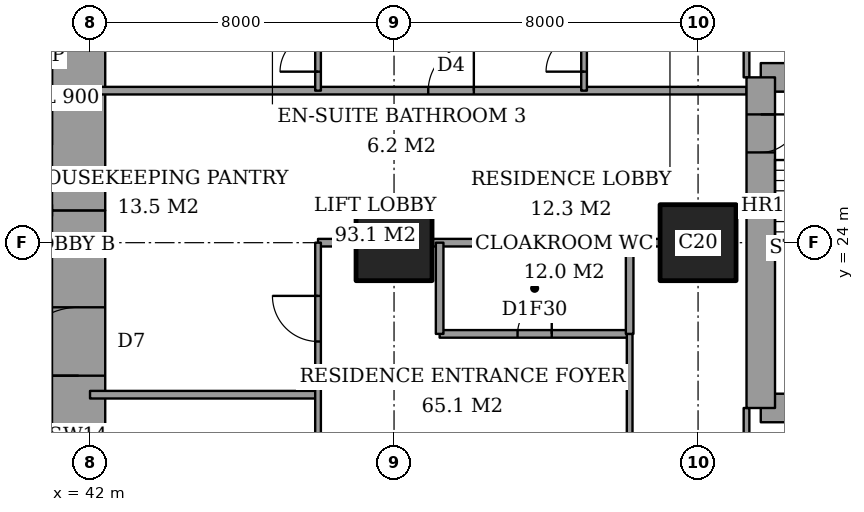
"""IFC4 building model, lengths in metres.
Left out: names, types, materials, properties, quantities, classifications, styles, units other than length and angle.
Written with IfcOpenShell. Run it as: python <this file> out.ifc"""

import sys

from ifc_helpers import new_model, si_unit, direction, frame, frame_2d, origin, origin_2d, place, context, subcontext, project, spatial, rectangle, extrude, element, fill, save


model = new_model("IFC4")
c1 = context("Model", 3, precision=1e-05, world=origin(), true_north=direction((0.0, 1.0)))
c2 = subcontext(c1, "Body", "Model", "MODEL_VIEW")
j1 = project(units=[si_unit("LENGTHUNIT", "METRE"), si_unit("PLANEANGLEUNIT", "RADIAN")], contexts=[c1])
p1 = place(None, origin())
s1 = spatial("IfcSite", under=j1, at=p1, CompositionType="ELEMENT")
p2 = place(p1, origin())
s2 = spatial("IfcBuilding", under=s1, at=p2, CompositionType="ELEMENT")
p3 = place(p2, frame((0.0, 0.0, 99.8)))
s3 = spatial("IfcBuildingStorey", under=s2, at=p3, CompositionType="ELEMENT", Elevation=99.8)
for number, where, z_axis, x_axis in (
    (1, (50.0, 24.0, 0.0), (0.0, 0.0, 1.0), (1.0, 0.0, 0.0)),
    (2, (58.0, 24.0, 0.0), (0.0, 0.0, 1.0), (1.0, 0.0, 0.0)),
):
    element("IfcColumn", number, at=place(p3, frame(where, z_axis=z_axis, x_axis=x_axis)), inside=s3, PredefinedType="COLUMN", context=c2, shape_type="SweptSolid", body=[
        extrude(rectangle(XDim=2.0, YDim=2.0, at=origin_2d()), origin(), (0.0, 0.0, 1.0), 3.6),
    ])
p4 = place(p3, frame((41.7, 13.0, 0.0), z_axis=(0.0, 0.0, 1.0), x_axis=(0.0, 1.0, 0.0)))
e3 = element("IfcWall", 3, at=p4, inside=s3, PredefinedType="SHEAR", context=c2, shape_type="SweptSolid", body=[
    extrude(rectangle(XDim=11.85, YDim=1.4, at=frame_2d((5.925, 0.0))), origin(), (0.0, 0.0, 1.0), 3.6),
])
p5 = place(p4, frame((7.5, 0.0, 0.0)))
e4 = element("IfcOpeningElement", 4, at=p5, cuts=e3, PredefinedType="OPENING", context=c2, shape_type="SweptSolid", body=[
    extrude(rectangle(XDim=1.8, YDim=2.4, at=frame_2d((0.9, 1.2))), frame((0.0, 0.71, 0.0), z_axis=(0.0, -1.0, 0.0), x_axis=(1.0, 0.0, 0.0)), (0.0, 0.0, 1.0), 1.42),
])
p6 = place(p3, frame((41.7, 24.85, 0.0), z_axis=(0.0, 0.0, 1.0), x_axis=(0.0, 1.0, 0.0)))
e5 = element("IfcWall", 5, at=p6, inside=s3, PredefinedType="SHEAR", context=c2, shape_type="SweptSolid", body=[
    extrude(rectangle(XDim=10.15, YDim=1.4, at=frame_2d((5.075, 0.0))), origin(), (0.0, 0.0, 1.0), 3.6),
])
for number, where, z_axis, x_axis in (
    (6, (59.65, 19.65, 0.0), (0.0, 0.0, 1.0), (1.0, 0.0, 0.0)),
    (7, (64.1, 28.35, 0.0), (0.0, 0.0, 1.0), (-1.0, 0.0, 0.0)),
):
    element("IfcWall", number, at=place(p3, frame(where, z_axis=z_axis, x_axis=x_axis)), inside=s3, PredefinedType="SHEAR", context=c2, shape_type="SweptSolid", body=[
        extrude(rectangle(XDim=4.45, YDim=0.75, at=frame_2d((2.225, 0.0))), origin(), (0.0, 0.0, 1.0), 3.6),
    ])
p7 = place(p3, frame((59.65, 28.35, 0.0), z_axis=(0.0, 0.0, 1.0), x_axis=(0.0, -1.0, 0.0)))
e8 = element("IfcWall", 8, at=p7, inside=s3, PredefinedType="SHEAR", context=c2, shape_type="SweptSolid", body=[
    extrude(rectangle(XDim=8.7, YDim=0.75, at=frame_2d((4.35, 0.0))), origin(), (0.0, 0.0, 1.0), 3.6),
])
p8 = place(p7, frame((0.975, 0.0, 0.0)))
e9 = element("IfcOpeningElement", 9, at=p8, cuts=e8, PredefinedType="OPENING", context=c2, shape_type="SweptSolid", body=[
    extrude(rectangle(XDim=1.0, YDim=2.1, at=frame_2d((0.5, 1.05))), frame((0.0, 0.385, 0.0), z_axis=(0.0, -1.0, 0.0), x_axis=(1.0, 0.0, 0.0)), (0.0, 0.0, 1.0), 0.77),
])
p9 = place(p3, frame((42.0, 20.0, 0.0), z_axis=(0.0, 0.0, 1.0), x_axis=(1.0, 0.0, 0.0)))
e10 = element("IfcWall", 10, at=p9, inside=s3, PredefinedType="PARTITIONING", context=c2, shape_type="SweptSolid", body=[
    extrude(rectangle(XDim=6.0, YDim=0.2, at=frame_2d((3.0, 0.0))), origin(), (0.0, 0.0, 1.0), 3.35),
])
p10 = place(p3, frame((51.2, 21.6, 0.0), z_axis=(0.0, 0.0, 1.0), x_axis=(1.0, 0.0, 0.0)))
e11 = element("IfcWall", 11, at=p10, inside=s3, PredefinedType="PARTITIONING", context=c2, shape_type="SweptSolid", body=[
    extrude(rectangle(XDim=5.0, YDim=0.2, at=frame_2d((2.5, 0.0))), origin(), (0.0, 0.0, 1.0), 3.35),
])
p11 = place(p10, frame((2.05, 0.0, 0.0)))
e12 = element("IfcOpeningElement", 12, at=p11, cuts=e11, PredefinedType="OPENING", context=c2, shape_type="SweptSolid", body=[
    extrude(rectangle(XDim=0.9, YDim=2.1, at=frame_2d((0.45, 1.05))), frame((0.0, 0.11, 0.0), z_axis=(0.0, -1.0, 0.0), x_axis=(1.0, 0.0, 0.0)), (0.0, 0.0, 1.0), 0.22),
])
p12 = place(p3, frame((48.0, 24.0, 0.0), z_axis=(0.0, 0.0, 1.0), x_axis=(1.0, 0.0, 0.0)))
e13 = element("IfcWall", 13, at=p12, inside=s3, PredefinedType="PARTITIONING", context=c2, shape_type="SweptSolid", body=[
    extrude(rectangle(XDim=1.0, YDim=0.2, at=frame_2d((0.5, 0.0))), origin(), (0.0, 0.0, 1.0), 3.35),
])
p13 = place(p3, frame((51.0, 24.0, 0.0), z_axis=(0.0, 0.0, 1.0), x_axis=(1.0, 0.0, 0.0)))
e14 = element("IfcWall", 14, at=p13, inside=s3, PredefinedType="PARTITIONING", context=c2, shape_type="SweptSolid", body=[
    extrude(rectangle(XDim=6.0, YDim=0.2, at=frame_2d((3.0, 0.0))), origin(), (0.0, 0.0, 1.0), 3.35),
])
p14 = place(p3, frame((42.0, 28.0, 0.0), z_axis=(0.0, 0.0, 1.0), x_axis=(1.0, 0.0, 0.0)))
e15 = element("IfcWall", 15, at=p14, inside=s3, PredefinedType="PARTITIONING", context=c2, shape_type="SweptSolid", body=[
    extrude(rectangle(XDim=17.275, YDim=0.2, at=frame_2d((8.637, 0.0))), origin(), (0.0, 0.0, 1.0), 3.35),
])
p15 = place(p14, frame((8.9, 0.0, 0.0)))
e16 = element("IfcOpeningElement", 16, at=p15, cuts=e15, PredefinedType="OPENING", context=c2, shape_type="SweptSolid", body=[
    extrude(rectangle(XDim=1.2, YDim=2.4, at=frame_2d((0.6, 1.2))), frame((0.0, 0.11, 0.0), z_axis=(0.0, -1.0, 0.0), x_axis=(1.0, 0.0, 0.0)), (0.0, 0.0, 1.0), 0.22),
])
p16 = place(p3, frame((48.0, 10.6, 0.0), z_axis=(0.0, 0.0, 1.0), x_axis=(0.0, 1.0, 0.0)))
e17 = element("IfcWall", 17, at=p16, inside=s3, PredefinedType="PARTITIONING", context=c2, shape_type="SweptSolid", body=[
    extrude(rectangle(XDim=13.4, YDim=0.15, at=frame_2d((6.7, 0.0))), origin(), (0.0, 0.0, 1.0), 3.35),
])
p17 = place(p16, frame((10.8, 0.0, 0.0)))
e18 = element("IfcOpeningElement", 18, at=p17, cuts=e17, PredefinedType="OPENING", context=c2, shape_type="SweptSolid", body=[
    extrude(rectangle(XDim=1.2, YDim=2.4, at=frame_2d((0.6, 1.2))), frame((0.0, 0.085, 0.0), z_axis=(0.0, -1.0, 0.0), x_axis=(1.0, 0.0, 0.0)), (0.0, 0.0, 1.0), 0.17),
])
p18 = place(p16, frame((6.7, 0.0, 0.0)))
e19 = element("IfcOpeningElement", 19, at=p18, cuts=e17, PredefinedType="OPENING", context=c2, shape_type="SweptSolid", body=[
    extrude(rectangle(XDim=0.9, YDim=2.1, at=frame_2d((0.45, 1.05))), frame((0.0, 0.085, 0.0), z_axis=(0.0, -1.0, 0.0), x_axis=(1.0, 0.0, 0.0)), (0.0, 0.0, 1.0), 0.17),
])
p19 = place(p3, frame((48.0, 28.0, 0.0), z_axis=(0.0, 0.0, 1.0), x_axis=(0.0, 1.0, 0.0)))
e20 = element("IfcWall", 20, at=p19, inside=s3, PredefinedType="PARTITIONING", context=c2, shape_type="SweptSolid", body=[
    extrude(rectangle(XDim=9.4, YDim=0.15, at=frame_2d((4.7, 0.0))), origin(), (0.0, 0.0, 1.0), 3.35),
])
p20 = place(p19, frame((0.5, 0.0, 0.0)))
e21 = element("IfcOpeningElement", 21, at=p20, cuts=e20, PredefinedType="OPENING", context=c2, shape_type="SweptSolid", body=[
    extrude(rectangle(XDim=1.0, YDim=2.1, at=frame_2d((0.5, 1.05))), frame((0.0, 0.085, 0.0), z_axis=(0.0, -1.0, 0.0), x_axis=(1.0, 0.0, 0.0)), (0.0, 0.0, 1.0), 0.17),
])
p21 = place(p3, frame((51.2, 21.6, 0.0), z_axis=(0.0, 0.0, 1.0), x_axis=(0.0, 1.0, 0.0)))
e22 = element("IfcWall", 22, at=p21, inside=s3, PredefinedType="PARTITIONING", context=c2, shape_type="SweptSolid", body=[
    extrude(rectangle(XDim=2.4, YDim=0.2, at=frame_2d((1.2, 0.0))), origin(), (0.0, 0.0, 1.0), 3.35),
])
p22 = place(p3, frame((55.0, 28.0, 0.0), z_axis=(0.0, 0.0, 1.0), x_axis=(0.0, 1.0, 0.0)))
e23 = element("IfcWall", 23, at=p22, inside=s3, PredefinedType="PARTITIONING", context=c2, shape_type="SweptSolid", body=[
    extrude(rectangle(XDim=9.4, YDim=0.15, at=frame_2d((4.7, 0.0))), origin(), (0.0, 0.0, 1.0), 3.35),
])
p23 = place(p22, frame((0.5, 0.0, 0.0)))
e24 = element("IfcOpeningElement", 24, at=p23, cuts=e23, PredefinedType="OPENING", context=c2, shape_type="SweptSolid", body=[
    extrude(rectangle(XDim=1.0, YDim=2.1, at=frame_2d((0.5, 1.05))), frame((0.0, 0.085, 0.0), z_axis=(0.0, -1.0, 0.0), x_axis=(1.0, 0.0, 0.0)), (0.0, 0.0, 1.0), 0.17),
])
p24 = place(p3, frame((56.2, 21.6, 0.0), z_axis=(0.0, 0.0, 1.0), x_axis=(0.0, 1.0, 0.0)))
e25 = element("IfcWall", 25, at=p24, inside=s3, PredefinedType="PARTITIONING", context=c2, shape_type="SweptSolid", body=[
    extrude(rectangle(XDim=2.4, YDim=0.2, at=frame_2d((1.2, 0.0))), origin(), (0.0, 0.0, 1.0), 3.35),
])
p25 = place(p3, frame((56.2, 10.6, 0.0), z_axis=(0.0, 0.0, 1.0), x_axis=(0.0, 1.0, 0.0)))
e26 = element("IfcWall", 26, at=p25, inside=s3, PredefinedType="PARTITIONING", context=c2, shape_type="SweptSolid", body=[
    extrude(rectangle(XDim=11.0, YDim=0.15, at=frame_2d((5.5, 0.0))), origin(), (0.0, 0.0, 1.0), 3.35),
])
p26 = place(p25, frame((7.0, 0.0, 0.0)))
e27 = element("IfcOpeningElement", 27, at=p26, cuts=e26, PredefinedType="OPENING", context=c2, shape_type="SweptSolid", body=[
    extrude(rectangle(XDim=1.0, YDim=2.1, at=frame_2d((0.5, 1.05))), frame((0.0, 0.085, 0.0), z_axis=(0.0, -1.0, 0.0), x_axis=(1.0, 0.0, 0.0)), (0.0, 0.0, 1.0), 0.17),
])
p27 = place(p3, frame((59.275, 17.2, 0.0), z_axis=(0.0, 0.0, 1.0), x_axis=(0.0, 1.0, 0.0)))
e28 = element("IfcWall", 28, at=p27, inside=s3, PredefinedType="PARTITIONING", context=c2, shape_type="SweptSolid", body=[
    extrude(rectangle(XDim=2.45, YDim=0.15, at=frame_2d((1.225, 0.0))), origin(), (0.0, 0.0, 1.0), 3.35),
])
p28 = place(p27, frame((0.538, 0.0, 0.0)))
e29 = element("IfcOpeningElement", 29, at=p28, cuts=e28, PredefinedType="OPENING", context=c2, shape_type="SweptSolid", body=[
    extrude(rectangle(XDim=1.0, YDim=2.1, at=frame_2d((0.5, 1.05))), frame((0.0, 0.085, 0.0), z_axis=(0.0, -1.0, 0.0), x_axis=(1.0, 0.0, 0.0)), (0.0, 0.0, 1.0), 0.17),
])
p29 = place(p3, frame((59.275, 28.35, 0.0), z_axis=(0.0, 0.0, 1.0), x_axis=(0.0, 1.0, 0.0)))
e30 = element("IfcWall", 30, at=p29, inside=s3, PredefinedType="PARTITIONING", context=c2, shape_type="SweptSolid", body=[
    extrude(rectangle(XDim=2.45, YDim=0.15, at=frame_2d((1.225, 0.0))), origin(), (0.0, 0.0, 1.0), 3.35),
])
p30 = place(p29, frame((0.913, 0.0, 0.0)))
e31 = element("IfcOpeningElement", 31, at=p30, cuts=e30, PredefinedType="OPENING", context=c2, shape_type="SweptSolid", body=[
    extrude(rectangle(XDim=1.0, YDim=2.1, at=frame_2d((0.5, 1.05))), frame((0.0, 0.085, 0.0), z_axis=(0.0, -1.0, 0.0), x_axis=(1.0, 0.0, 0.0)), (0.0, 0.0, 1.0), 0.17),
])
p31 = place(p11, origin())
e32 = element("IfcDoor", 32, at=p31, inside=s3, OperationType="SINGLE_SWING_LEFT", PredefinedType="DOOR", context=c2, shape_type="SweptSolid", body=[
    extrude(rectangle(XDim=0.9, YDim=2.1, at=frame_2d((0.45, 1.05))), frame((0.0, 0.025, 0.0), z_axis=(0.0, -1.0, 0.0), x_axis=(1.0, 0.0, 0.0)), (0.0, 0.0, 1.0), 0.05),
])
fill(e12, e32)
p32 = place(p17, origin())
e33 = element("IfcDoor", 33, at=p32, inside=s3, OperationType="SINGLE_SWING_LEFT", PredefinedType="DOOR", context=c2, shape_type="SweptSolid", body=[
    extrude(rectangle(XDim=1.2, YDim=2.4, at=frame_2d((0.6, 1.2))), frame((0.0, 0.025, 0.0), z_axis=(0.0, -1.0, 0.0), x_axis=(1.0, 0.0, 0.0)), (0.0, 0.0, 1.0), 0.05),
])
fill(e18, e33)
p33 = place(p23, origin())
e34 = element("IfcDoor", 34, at=p33, inside=s3, OperationType="SINGLE_SWING_RIGHT", PredefinedType="DOOR", context=c2, shape_type="SweptSolid", body=[
    extrude(rectangle(XDim=1.0, YDim=2.1, at=frame_2d((0.5, 1.05))), frame((0.0, 0.025, 0.0), z_axis=(0.0, -1.0, 0.0), x_axis=(1.0, 0.0, 0.0)), (0.0, 0.0, 1.0), 0.05),
])
fill(e24, e34)
p34 = place(p15, origin())
e35 = element("IfcDoor", 35, at=p34, inside=s3, OperationType="SINGLE_SWING_LEFT", PredefinedType="DOOR", context=c2, shape_type="SweptSolid", body=[
    extrude(rectangle(XDim=1.2, YDim=2.4, at=frame_2d((0.6, 1.2))), frame((0.0, 0.025, 0.0), z_axis=(0.0, -1.0, 0.0), x_axis=(1.0, 0.0, 0.0)), (0.0, 0.0, 1.0), 0.05),
])
fill(e16, e35)
p35 = place(p20, origin())
e36 = element("IfcDoor", 36, at=p35, inside=s3, OperationType="SINGLE_SWING_RIGHT", PredefinedType="DOOR", context=c2, shape_type="SweptSolid", body=[
    extrude(rectangle(XDim=1.0, YDim=2.1, at=frame_2d((0.5, 1.05))), frame((0.0, 0.025, 0.0), z_axis=(0.0, -1.0, 0.0), x_axis=(1.0, 0.0, 0.0)), (0.0, 0.0, 1.0), 0.05),
])
fill(e21, e36)
p36 = place(p5, origin())
e37 = element("IfcDoor", 37, at=p36, inside=s3, OperationType="DOUBLE_DOOR_DOUBLE_SWING", PredefinedType="DOOR", context=c2, shape_type="SweptSolid", body=[
    extrude(rectangle(XDim=1.8, YDim=2.4, at=frame_2d((0.9, 1.2))), frame((0.0, 0.025, 0.0), z_axis=(0.0, -1.0, 0.0), x_axis=(1.0, 0.0, 0.0)), (0.0, 0.0, 1.0), 0.05),
])
fill(e4, e37)
p37 = place(p8, origin())
e38 = element("IfcDoor", 38, at=p37, inside=s3, OperationType="SINGLE_SWING_RIGHT", PredefinedType="DOOR", context=c2, shape_type="SweptSolid", body=[
    extrude(rectangle(XDim=1.0, YDim=2.1, at=frame_2d((0.5, 1.05))), frame((0.0, 0.025, 0.0), z_axis=(0.0, -1.0, 0.0), x_axis=(1.0, 0.0, 0.0)), (0.0, 0.0, 1.0), 0.05),
])
fill(e9, e38)
save(model, sys.argv[1])
